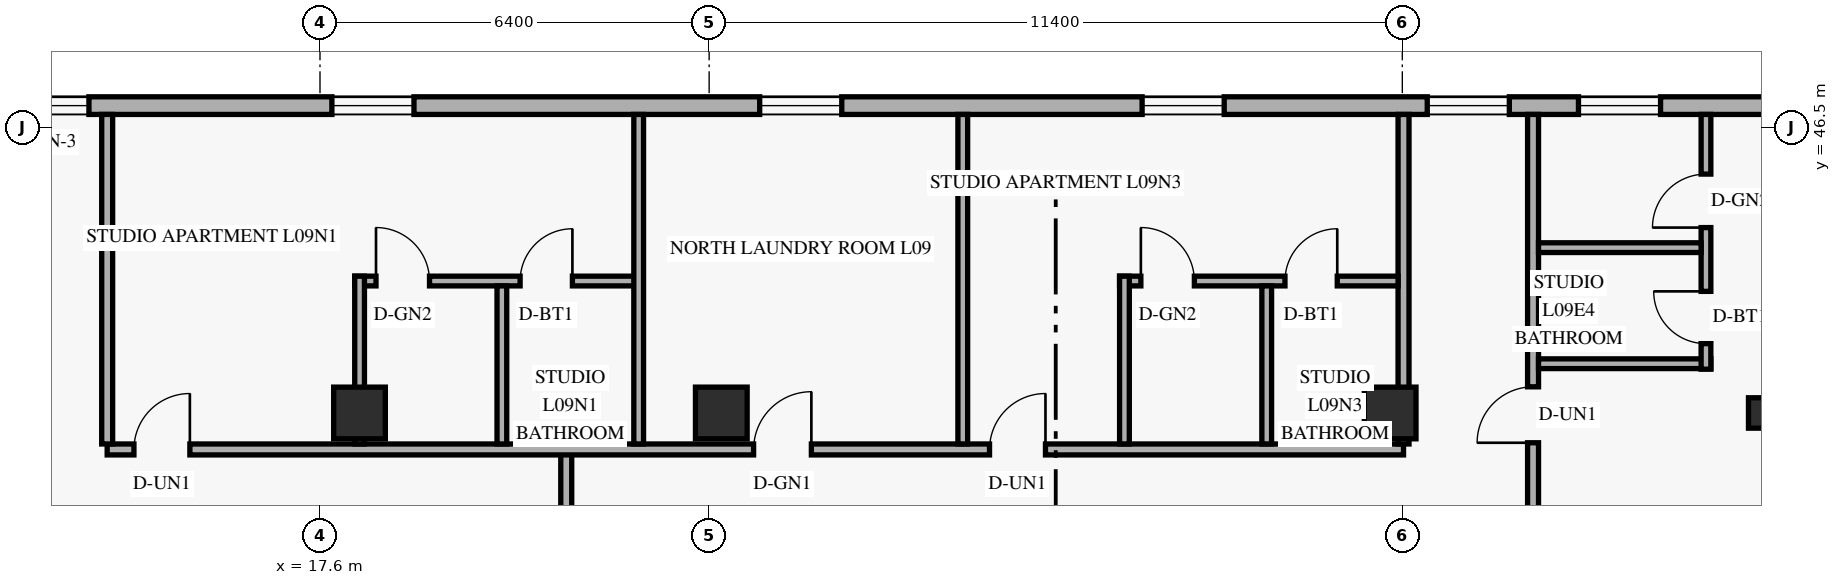
"""IFC4 building model, lengths in metres.
Left out: names, types, materials, properties, quantities, classifications, styles, units other than length and angle.
Written with IfcOpenShell. Run it as: python <this file> out.ifc"""

import sys

from ifc_helpers import new_model, si_unit, direction, frame, frame_2d, origin, origin_2d, place, context, subcontext, project, spatial, rectangle, hollow_rectangle, extrude, element, fill, save


model = new_model("IFC4")
c1 = context("Model", 3, precision=1e-05, world=origin(), true_north=direction((0.0, 1.0)))
c2 = subcontext(c1, "Body", "Model", "MODEL_VIEW")
j1 = project(units=[si_unit("LENGTHUNIT", "METRE"), si_unit("PLANEANGLEUNIT", "RADIAN")], contexts=[c1])
p1 = place(None, origin())
s1 = spatial("IfcSite", under=j1, at=p1, CompositionType="ELEMENT")
p2 = place(p1, origin())
s2 = spatial("IfcBuilding", under=s1, at=p2, CompositionType="ELEMENT")
p3 = place(p2, frame((0.0, 0.0, 38.4)))
s3 = spatial("IfcBuildingStorey", under=s2, at=p3, CompositionType="ELEMENT", Elevation=38.4)
for number, where, z_axis, x_axis in (
    (1, (18.25, 41.8, 0.0), (0.0, 0.0, 1.0), (1.0, 0.0, 0.0)),
    (2, (24.2, 41.8, 0.0), (0.0, 0.0, 1.0), (1.0, 0.0, 0.0)),
    (3, (35.2, 41.8, 0.0), (0.0, 0.0, 1.0), (1.0, 0.0, 0.0)),
):
    element("IfcColumn", number, at=place(p3, frame(where, z_axis=z_axis, x_axis=x_axis)), inside=s3, PredefinedType="COLUMN", context=c2, shape_type="SweptSolid", body=[
        extrude(rectangle(XDim=0.85, YDim=0.85, at=origin_2d()), origin(), (0.0, 0.0, 1.0), 3.6),
    ])
p4 = place(p3, frame((41.28, 41.8, 0.0), z_axis=(0.034971136209, 0.0, 0.999388322742), x_axis=(0.0, 1.0, 0.0)))
e4 = element("IfcColumn", 4, at=p4, inside=s3, PredefinedType="COLUMN", context=c2, shape_type="SweptSolid", body=[
    extrude(hollow_rectangle(XDim=0.5, YDim=0.5, WallThickness=0.022, at=origin_2d()), origin(), (0.0, 0.0, 1.0), 3.602),
])
p5 = place(p3, frame((44.98, 46.855, 0.0), z_axis=(0.0, 0.0, 1.0), x_axis=(-1.0, 0.0, 0.0)))
e5 = element("IfcWall", 5, at=p5, inside=s3, PredefinedType="SOLIDWALL", context=c2, shape_type="SweptSolid", body=[
    extrude(rectangle(XDim=39.56, YDim=0.29, at=frame_2d((19.78, 0.0))), origin(), (0.0, 0.0, 1.0), 3.36),
])
p6 = place(p5, frame((35.445, 0.0, 0.85)))
e6 = element("IfcOpeningElement", 6, at=p6, cuts=e5, PredefinedType="OPENING", context=c2, shape_type="SweptSolid", body=[
    extrude(rectangle(XDim=1.35, YDim=1.55, at=frame_2d((0.675, 0.775))), frame((0.0, 0.155, 0.0), z_axis=(0.0, -1.0, 0.0), x_axis=(1.0, 0.0, 0.0)), (0.0, 0.0, 1.0), 0.31),
])
p7 = place(p5, frame((31.18, 0.0, 0.85)))
e7 = element("IfcOpeningElement", 7, at=p7, cuts=e5, PredefinedType="OPENING", context=c2, shape_type="SweptSolid", body=[
    extrude(rectangle(XDim=1.2, YDim=1.5, at=frame_2d((0.6, 0.75))), frame((0.0, 0.155, 0.0), z_axis=(0.0, -1.0, 0.0), x_axis=(1.0, 0.0, 0.0)), (0.0, 0.0, 1.0), 0.31),
])
p8 = place(p5, frame((25.834, 0.0, 0.85)))
e8 = element("IfcOpeningElement", 8, at=p8, cuts=e5, PredefinedType="OPENING", context=c2, shape_type="SweptSolid", body=[
    extrude(rectangle(XDim=1.35, YDim=1.55, at=frame_2d((0.675, 0.775))), frame((0.0, 0.155, 0.0), z_axis=(0.0, -1.0, 0.0), x_axis=(1.0, 0.0, 0.0)), (0.0, 0.0, 1.0), 0.31),
])
p9 = place(p5, frame((18.799, 0.0, 0.85)))
e9 = element("IfcOpeningElement", 9, at=p9, cuts=e5, PredefinedType="OPENING", context=c2, shape_type="SweptSolid", body=[
    extrude(rectangle(XDim=1.35, YDim=1.55, at=frame_2d((0.675, 0.775))), frame((0.0, 0.155, 0.0), z_axis=(0.0, -1.0, 0.0), x_axis=(1.0, 0.0, 0.0)), (0.0, 0.0, 1.0), 0.31),
])
p10 = place(p5, frame((12.51, 0.0, 0.85)))
e10 = element("IfcOpeningElement", 10, at=p10, cuts=e5, PredefinedType="OPENING", context=c2, shape_type="SweptSolid", body=[
    extrude(rectangle(XDim=1.35, YDim=1.55, at=frame_2d((0.675, 0.775))), frame((0.0, 0.155, 0.0), z_axis=(0.0, -1.0, 0.0), x_axis=(1.0, 0.0, 0.0)), (0.0, 0.0, 1.0), 0.31),
])
p11 = place(p5, frame((7.82, 0.0, 0.85)))
e11 = element("IfcOpeningElement", 11, at=p11, cuts=e5, PredefinedType="OPENING", context=c2, shape_type="SweptSolid", body=[
    extrude(rectangle(XDim=1.35, YDim=1.55, at=frame_2d((0.675, 0.775))), frame((0.0, 0.155, 0.0), z_axis=(0.0, -1.0, 0.0), x_axis=(1.0, 0.0, 0.0)), (0.0, 0.0, 1.0), 0.31),
])
p12 = place(p5, frame((5.333, 0.0, 0.85)))
e12 = element("IfcOpeningElement", 12, at=p12, cuts=e5, PredefinedType="OPENING", context=c2, shape_type="SweptSolid", body=[
    extrude(rectangle(XDim=1.35, YDim=1.55, at=frame_2d((0.675, 0.775))), frame((0.0, 0.155, 0.0), z_axis=(0.0, -1.0, 0.0), x_axis=(1.0, 0.0, 0.0)), (0.0, 0.0, 1.0), 0.31),
])
p13 = place(p5, frame((1.618, 0.0, 0.85)))
e13 = element("IfcOpeningElement", 13, at=p13, cuts=e5, PredefinedType="OPENING", context=c2, shape_type="SweptSolid", body=[
    extrude(rectangle(XDim=1.35, YDim=1.55, at=frame_2d((0.675, 0.775))), frame((0.0, 0.155, 0.0), z_axis=(0.0, -1.0, 0.0), x_axis=(1.0, 0.0, 0.0)), (0.0, 0.0, 1.0), 0.31),
])
p14 = place(p3, frame((37.55, 1.29, 0.0), z_axis=(0.0, 0.0, 1.0), x_axis=(0.0, 1.0, 0.0)))
e14 = element("IfcWall", 14, at=p14, inside=s3, PredefinedType="STANDARD", context=c2, shape_type="SweptSolid", body=[
    extrude(rectangle(XDim=45.42, YDim=0.18, at=frame_2d((22.71, 0.0))), origin(), (0.0, 0.0, 1.0), 2.649),
])
p15 = place(p14, frame((4.46, 0.0, 0.0)))
e15 = element("IfcOpeningElement", 15, at=p15, cuts=e14, PredefinedType="OPENING", context=c2, shape_type="SweptSolid", body=[
    extrude(rectangle(XDim=0.92, YDim=2.15, at=frame_2d((0.46, 1.075))), frame((0.0, 0.1, 0.0), z_axis=(0.0, -1.0, 0.0), x_axis=(1.0, 0.0, 0.0)), (0.0, 0.0, 1.0), 0.2),
])
p16 = place(p14, frame((15.907, 0.0, 0.0)))
e16 = element("IfcOpeningElement", 16, at=p16, cuts=e14, PredefinedType="OPENING", context=c2, shape_type="SweptSolid", body=[
    extrude(rectangle(XDim=0.92, YDim=2.15, at=frame_2d((0.46, 1.075))), frame((0.0, 0.1, 0.0), z_axis=(0.0, -1.0, 0.0), x_axis=(1.0, 0.0, 0.0)), (0.0, 0.0, 1.0), 0.2),
])
p17 = place(p14, frame((28.23, 0.0, 0.0)))
e17 = element("IfcOpeningElement", 17, at=p17, cuts=e14, PredefinedType="OPENING", context=c2, shape_type="SweptSolid", body=[
    extrude(rectangle(XDim=0.92, YDim=2.15, at=frame_2d((0.46, 1.075))), frame((0.0, 0.1, 0.0), z_axis=(0.0, -1.0, 0.0), x_axis=(1.0, 0.0, 0.0)), (0.0, 0.0, 1.0), 0.2),
])
p18 = place(p14, frame((40.02, 0.0, 0.0)))
e18 = element("IfcOpeningElement", 18, at=p18, cuts=e14, PredefinedType="OPENING", context=c2, shape_type="SweptSolid", body=[
    extrude(rectangle(XDim=0.92, YDim=2.15, at=frame_2d((0.46, 1.075))), frame((0.0, 0.1, 0.0), z_axis=(0.0, -1.0, 0.0), x_axis=(1.0, 0.0, 0.0)), (0.0, 0.0, 1.0), 0.2),
])
p19 = place(p3, frame((21.65, 6.8, 0.0), z_axis=(0.0, 0.0, 1.0), x_axis=(0.0, 1.0, 0.0)))
e19 = element("IfcWall", 19, at=p19, inside=s3, PredefinedType="STANDARD", context=c2, shape_type="SweptSolid", body=[
    extrude(rectangle(XDim=34.4, YDim=0.18, at=frame_2d((17.2, 0.0))), origin(), (0.0, 0.0, 1.0), 2.649),
])
p20 = place(p3, frame((14.1, 41.2, 0.0), z_axis=(0.0, 0.0, 1.0), x_axis=(1.0, 0.0, 0.0)))
e20 = element("IfcWall", 20, at=p20, inside=s3, PredefinedType="STANDARD", context=c2, shape_type="SweptSolid", body=[
    extrude(rectangle(XDim=21.32, YDim=0.18, at=frame_2d((10.66, 0.0))), origin(), (0.0, 0.0, 1.0), 2.649),
])
p21 = place(p20, frame((0.44, 0.0, 0.0)))
e21 = element("IfcOpeningElement", 21, at=p21, cuts=e20, PredefinedType="OPENING", context=c2, shape_type="SweptSolid", body=[
    extrude(rectangle(XDim=0.92, YDim=2.15, at=frame_2d((0.46, 1.075))), frame((0.0, 0.1, 0.0), z_axis=(0.0, -1.0, 0.0), x_axis=(1.0, 0.0, 0.0)), (0.0, 0.0, 1.0), 0.2),
])
p22 = place(p20, frame((10.631, 0.0, 0.0)))
e22 = element("IfcOpeningElement", 22, at=p22, cuts=e20, PredefinedType="OPENING", context=c2, shape_type="SweptSolid", body=[
    extrude(rectangle(XDim=0.95, YDim=2.15, at=frame_2d((0.475, 1.075))), frame((0.0, 0.1, 0.0), z_axis=(0.0, -1.0, 0.0), x_axis=(1.0, 0.0, 0.0)), (0.0, 0.0, 1.0), 0.2),
])
p23 = place(p20, frame((14.511, 0.0, 0.0)))
e23 = element("IfcOpeningElement", 23, at=p23, cuts=e20, PredefinedType="OPENING", context=c2, shape_type="SweptSolid", body=[
    extrude(rectangle(XDim=0.92, YDim=2.15, at=frame_2d((0.46, 1.075))), frame((0.0, 0.1, 0.0), z_axis=(0.0, -1.0, 0.0), x_axis=(1.0, 0.0, 0.0)), (0.0, 0.0, 1.0), 0.2),
])
p24 = place(p3, frame((35.42, 41.29, 0.0), z_axis=(0.0, 0.0, 1.0), x_axis=(0.0, 1.0, 0.0)))
e24 = element("IfcWall", 24, at=p24, inside=s3, PredefinedType="PARTITIONING", context=c2, shape_type="SweptSolid", body=[
    extrude(rectangle(XDim=5.42, YDim=0.18, at=frame_2d((2.71, 0.0))), origin(), (0.0, 0.0, 1.0), 3.36),
])
p25 = place(p3, frame((14.1, 41.29, 0.0), z_axis=(0.0, 0.0, 1.0), x_axis=(0.0, 1.0, 0.0)))
e25 = element("IfcWall", 25, at=p25, inside=s3, PredefinedType="PARTITIONING", context=c2, shape_type="SweptSolid", body=[
    extrude(rectangle(XDim=5.42, YDim=0.18, at=frame_2d((2.71, 0.0))), origin(), (0.0, 0.0, 1.0), 2.809),
])
p26 = place(p3, frame((37.64, 42.61, 0.0), z_axis=(0.0, 0.0, 1.0), x_axis=(1.0, 0.0, 0.0)))
e26 = element("IfcWall", 26, at=p26, inside=s3, PredefinedType="PLUMBINGWALL", context=c2, shape_type="SweptSolid", body=[
    extrude(rectangle(XDim=2.834, YDim=0.16, at=frame_2d((1.417, 0.0))), origin(), (0.0, 0.0, 1.0), 3.36),
])
p27 = place(p3, frame((40.394, 42.52, 0.0), z_axis=(0.0, 0.0, 1.0), x_axis=(0.0, 1.0, 0.0)))
e27 = element("IfcWall", 27, at=p27, inside=s3, PredefinedType="PLUMBINGWALL", context=c2, shape_type="SweptSolid", body=[
    extrude(rectangle(XDim=4.19, YDim=0.16, at=frame_2d((2.095, 0.0))), origin(), (0.0, 0.0, 1.0), 3.36),
])
p28 = place(p27, frame((0.42, 0.0, 0.0)))
e28 = element("IfcOpeningElement", 28, at=p28, cuts=e27, PredefinedType="OPENING", context=c2, shape_type="SweptSolid", body=[
    extrude(rectangle(XDim=0.86, YDim=2.12, at=frame_2d((0.43, 1.06))), frame((0.0, 0.09, 0.0), z_axis=(0.0, -1.0, 0.0), x_axis=(1.0, 0.0, 0.0)), (0.0, 0.0, 1.0), 0.18),
])
p29 = place(p27, frame((2.329, 0.0, 0.0)))
e29 = element("IfcOpeningElement", 29, at=p29, cuts=e27, PredefinedType="OPENING", context=c2, shape_type="SweptSolid", body=[
    extrude(rectangle(XDim=0.88, YDim=2.12, at=frame_2d((0.44, 1.06))), frame((0.0, 0.09, 0.0), z_axis=(0.0, -1.0, 0.0), x_axis=(1.0, 0.0, 0.0)), (0.0, 0.0, 1.0), 0.18),
])
p30 = place(p3, frame((37.64, 44.519, 0.0), z_axis=(0.0, 0.0, 1.0), x_axis=(1.0, 0.0, 0.0)))
e30 = element("IfcWall", 30, at=p30, inside=s3, PredefinedType="PLUMBINGWALL", context=c2, shape_type="SweptSolid", body=[
    extrude(rectangle(XDim=2.674, YDim=0.16, at=frame_2d((1.337, 0.0))), origin(), (0.0, 0.0, 1.0), 3.36),
])
p31 = place(p3, frame((18.171, 43.97, 0.0), z_axis=(0.0, 0.0, 1.0), x_axis=(1.0, 0.0, 0.0)))
e31 = element("IfcWall", 31, at=p31, inside=s3, PredefinedType="PLUMBINGWALL", context=c2, shape_type="SweptSolid", body=[
    extrude(rectangle(XDim=4.67, YDim=0.16, at=frame_2d((2.335, 0.0))), origin(), (0.0, 0.0, 1.0), 3.36),
])
p32 = place(p31, frame((0.35, 0.0, 0.0)))
e32 = element("IfcOpeningElement", 32, at=p32, cuts=e31, PredefinedType="OPENING", context=c2, shape_type="SweptSolid", body=[
    extrude(rectangle(XDim=0.88, YDim=2.12, at=frame_2d((0.44, 1.06))), frame((0.0, 0.09, 0.0), z_axis=(0.0, -1.0, 0.0), x_axis=(1.0, 0.0, 0.0)), (0.0, 0.0, 1.0), 0.18),
])
p33 = place(p31, frame((2.72, 0.0, 0.0)))
e33 = element("IfcOpeningElement", 33, at=p33, cuts=e31, PredefinedType="OPENING", context=c2, shape_type="SweptSolid", body=[
    extrude(rectangle(XDim=0.86, YDim=2.12, at=frame_2d((0.43, 1.06))), frame((0.0, 0.09, 0.0), z_axis=(0.0, -1.0, 0.0), x_axis=(1.0, 0.0, 0.0)), (0.0, 0.0, 1.0), 0.18),
])
p34 = place(p3, frame((18.251, 41.29, 0.0), z_axis=(0.0, 0.0, 1.0), x_axis=(0.0, 1.0, 0.0)))
e34 = element("IfcWall", 34, at=p34, inside=s3, PredefinedType="PLUMBINGWALL", context=c2, shape_type="SweptSolid", body=[
    extrude(rectangle(XDim=2.76, YDim=0.16, at=frame_2d((1.38, 0.0))), origin(), (0.0, 0.0, 1.0), 2.649),
])
p35 = place(p3, frame((20.591, 41.29, 0.0), z_axis=(0.0, 0.0, 1.0), x_axis=(0.0, 1.0, 0.0)))
e35 = element("IfcWall", 35, at=p35, inside=s3, PredefinedType="PLUMBINGWALL", context=c2, shape_type="SweptSolid", body=[
    extrude(rectangle(XDim=2.6, YDim=0.16, at=frame_2d((1.3, 0.0))), origin(), (0.0, 0.0, 1.0), 2.809),
])
for number, where, z_axis, x_axis in (
    (36, (22.841, 41.29, 0.0), (0.0, 0.0, 1.0), (0.0, 1.0, 0.0)),
    (37, (28.171, 41.29, 0.0), (0.0, 0.0, 1.0), (0.0, 1.0, 0.0)),
):
    element("IfcWall", number, at=place(p3, frame(where, z_axis=z_axis, x_axis=x_axis)), inside=s3, PredefinedType="PARTITIONING", context=c2, shape_type="SweptSolid", body=[
        extrude(rectangle(XDim=5.42, YDim=0.16, at=frame_2d((2.71, 0.0))), origin(), (0.0, 0.0, 1.0), 2.809),
    ])
p36 = place(p3, frame((30.75, 43.97, 0.0), z_axis=(0.0, 0.0, 1.0), x_axis=(1.0, 0.0, 0.0)))
e38 = element("IfcWall", 38, at=p36, inside=s3, PredefinedType="PLUMBINGWALL", context=c2, shape_type="SweptSolid", body=[
    extrude(rectangle(XDim=4.58, YDim=0.16, at=frame_2d((2.29, 0.0))), origin(), (0.0, 0.0, 1.0), 3.36),
])
p37 = place(p36, frame((0.35, 0.0, 0.0)))
e39 = element("IfcOpeningElement", 39, at=p37, cuts=e38, PredefinedType="OPENING", context=c2, shape_type="SweptSolid", body=[
    extrude(rectangle(XDim=0.88, YDim=2.12, at=frame_2d((0.44, 1.06))), frame((0.0, 0.09, 0.0), z_axis=(0.0, -1.0, 0.0), x_axis=(1.0, 0.0, 0.0)), (0.0, 0.0, 1.0), 0.18),
])
p38 = place(p36, frame((2.72, 0.0, 0.0)))
e40 = element("IfcOpeningElement", 40, at=p38, cuts=e38, PredefinedType="OPENING", context=c2, shape_type="SweptSolid", body=[
    extrude(rectangle(XDim=0.86, YDim=2.12, at=frame_2d((0.43, 1.06))), frame((0.0, 0.09, 0.0), z_axis=(0.0, -1.0, 0.0), x_axis=(1.0, 0.0, 0.0)), (0.0, 0.0, 1.0), 0.18),
])
p39 = place(p3, frame((30.83, 41.29, 0.0), z_axis=(0.0, 0.0, 1.0), x_axis=(0.0, 1.0, 0.0)))
e41 = element("IfcWall", 41, at=p39, inside=s3, PredefinedType="PLUMBINGWALL", context=c2, shape_type="SweptSolid", body=[
    extrude(rectangle(XDim=2.76, YDim=0.16, at=frame_2d((1.38, 0.0))), origin(), (0.0, 0.0, 1.0), 2.809),
])
p40 = place(p3, frame((33.17, 41.29, 0.0), z_axis=(0.0, 0.0, 1.0), x_axis=(0.0, 1.0, 0.0)))
e42 = element("IfcWall", 42, at=p40, inside=s3, PredefinedType="PLUMBINGWALL", context=c2, shape_type="SweptSolid", body=[
    extrude(rectangle(XDim=2.6, YDim=0.16, at=frame_2d((1.3, 0.0))), origin(), (0.0, 0.0, 1.0), 2.809),
])
p41 = place(p7, origin())
e43 = element("IfcWindow", 43, at=p41, inside=s3, PartitioningType="SINGLE_PANEL", PredefinedType="WINDOW", context=c2, shape_type="SweptSolid", body=[
    extrude(rectangle(XDim=1.2, YDim=1.5, at=frame_2d((0.6, 0.75))), frame((0.0, 0.03, 0.0), z_axis=(0.0, -1.0, 0.0), x_axis=(1.0, 0.0, 0.0)), (0.0, 0.0, 1.0), 0.06),
])
fill(e7, e43)
p42 = place(p8, origin())
e44 = element("IfcWindow", 44, at=p42, inside=s3, PartitioningType="SINGLE_PANEL", PredefinedType="WINDOW", context=c2, shape_type="SweptSolid", body=[
    extrude(rectangle(XDim=1.35, YDim=1.55, at=frame_2d((0.675, 0.775))), frame((0.0, 0.03, 0.0), z_axis=(0.0, -1.0, 0.0), x_axis=(1.0, 0.0, 0.0)), (0.0, 0.0, 1.0), 0.06),
])
fill(e8, e44)
p43 = place(p9, origin())
e45 = element("IfcWindow", 45, at=p43, inside=s3, PartitioningType="SINGLE_PANEL", PredefinedType="WINDOW", context=c2, shape_type="SweptSolid", body=[
    extrude(rectangle(XDim=1.35, YDim=1.55, at=frame_2d((0.675, 0.775))), frame((0.0, 0.03, 0.0), z_axis=(0.0, -1.0, 0.0), x_axis=(1.0, 0.0, 0.0)), (0.0, 0.0, 1.0), 0.06),
])
fill(e9, e45)
p44 = place(p10, origin())
e46 = element("IfcWindow", 46, at=p44, inside=s3, PartitioningType="SINGLE_PANEL", PredefinedType="WINDOW", context=c2, shape_type="SweptSolid", body=[
    extrude(rectangle(XDim=1.35, YDim=1.55, at=frame_2d((0.675, 0.775))), frame((0.0, 0.03, 0.0), z_axis=(0.0, -1.0, 0.0), x_axis=(1.0, 0.0, 0.0)), (0.0, 0.0, 1.0), 0.06),
])
fill(e10, e46)
p45 = place(p11, origin())
e47 = element("IfcWindow", 47, at=p45, inside=s3, PartitioningType="SINGLE_PANEL", PredefinedType="WINDOW", context=c2, shape_type="SweptSolid", body=[
    extrude(rectangle(XDim=1.35, YDim=1.55, at=frame_2d((0.675, 0.775))), frame((0.0, 0.03, 0.0), z_axis=(0.0, -1.0, 0.0), x_axis=(1.0, 0.0, 0.0)), (0.0, 0.0, 1.0), 0.06),
])
fill(e11, e47)
p46 = place(p12, origin())
e48 = element("IfcWindow", 48, at=p46, inside=s3, PartitioningType="SINGLE_PANEL", PredefinedType="WINDOW", context=c2, shape_type="SweptSolid", body=[
    extrude(rectangle(XDim=1.35, YDim=1.55, at=frame_2d((0.675, 0.775))), frame((0.0, 0.03, 0.0), z_axis=(0.0, -1.0, 0.0), x_axis=(1.0, 0.0, 0.0)), (0.0, 0.0, 1.0), 0.06),
])
fill(e12, e48)
p47 = place(p18, origin())
e49 = element("IfcDoor", 49, at=p47, inside=s3, OperationType="SINGLE_SWING_LEFT", PredefinedType="DOOR", context=c2, shape_type="SweptSolid", body=[
    extrude(rectangle(XDim=0.92, YDim=2.15, at=frame_2d((0.46, 1.075))), frame((0.0, 0.025, 0.0), z_axis=(0.0, -1.0, 0.0), x_axis=(1.0, 0.0, 0.0)), (0.0, 0.0, 1.0), 0.05),
])
fill(e18, e49)
p48 = place(p28, origin())
e50 = element("IfcDoor", 50, at=p48, inside=s3, OperationType="SINGLE_SWING_RIGHT", PredefinedType="DOOR", context=c2, shape_type="SweptSolid", body=[
    extrude(rectangle(XDim=0.86, YDim=2.12, at=frame_2d((0.43, 1.06))), frame((0.0, 0.025, 0.0), z_axis=(0.0, -1.0, 0.0), x_axis=(1.0, 0.0, 0.0)), (0.0, 0.0, 1.0), 0.05),
])
fill(e28, e50)
p49 = place(p29, origin())
e51 = element("IfcDoor", 51, at=p49, inside=s3, OperationType="SINGLE_SWING_LEFT", PredefinedType="DOOR", context=c2, shape_type="SweptSolid", body=[
    extrude(rectangle(XDim=0.88, YDim=2.12, at=frame_2d((0.44, 1.06))), frame((0.0, 0.025, 0.0), z_axis=(0.0, -1.0, 0.0), x_axis=(1.0, 0.0, 0.0)), (0.0, 0.0, 1.0), 0.05),
])
fill(e29, e51)
p50 = place(p21, origin())
e52 = element("IfcDoor", 52, at=p50, inside=s3, OperationType="SINGLE_SWING_RIGHT", PredefinedType="DOOR", context=c2, shape_type="SweptSolid", body=[
    extrude(rectangle(XDim=0.92, YDim=2.15, at=frame_2d((0.46, 1.075))), frame((0.0, 0.025, 0.0), z_axis=(0.0, -1.0, 0.0), x_axis=(1.0, 0.0, 0.0)), (0.0, 0.0, 1.0), 0.05),
])
fill(e21, e52)
p51 = place(p32, origin())
e53 = element("IfcDoor", 53, at=p51, inside=s3, OperationType="SINGLE_SWING_LEFT", PredefinedType="DOOR", context=c2, shape_type="SweptSolid", body=[
    extrude(rectangle(XDim=0.88, YDim=2.12, at=frame_2d((0.44, 1.06))), frame((0.0, 0.025, 0.0), z_axis=(0.0, -1.0, 0.0), x_axis=(1.0, 0.0, 0.0)), (0.0, 0.0, 1.0), 0.05),
])
fill(e32, e53)
p52 = place(p33, origin())
e54 = element("IfcDoor", 54, at=p52, inside=s3, OperationType="SINGLE_SWING_RIGHT", PredefinedType="DOOR", context=c2, shape_type="SweptSolid", body=[
    extrude(rectangle(XDim=0.86, YDim=2.12, at=frame_2d((0.43, 1.06))), frame((0.0, 0.025, 0.0), z_axis=(0.0, -1.0, 0.0), x_axis=(1.0, 0.0, 0.0)), (0.0, 0.0, 1.0), 0.05),
])
fill(e33, e54)
p53 = place(p22, origin())
e55 = element("IfcDoor", 55, at=p53, inside=s3, OperationType="SINGLE_SWING_RIGHT", PredefinedType="DOOR", context=c2, shape_type="SweptSolid", body=[
    extrude(rectangle(XDim=0.95, YDim=2.15, at=frame_2d((0.475, 1.075))), frame((0.0, 0.025, 0.0), z_axis=(0.0, -1.0, 0.0), x_axis=(1.0, 0.0, 0.0)), (0.0, 0.0, 1.0), 0.05),
])
fill(e22, e55)
p54 = place(p23, origin())
e56 = element("IfcDoor", 56, at=p54, inside=s3, OperationType="SINGLE_SWING_RIGHT", PredefinedType="DOOR", context=c2, shape_type="SweptSolid", body=[
    extrude(rectangle(XDim=0.92, YDim=2.15, at=frame_2d((0.46, 1.075))), frame((0.0, 0.025, 0.0), z_axis=(0.0, -1.0, 0.0), x_axis=(1.0, 0.0, 0.0)), (0.0, 0.0, 1.0), 0.05),
])
fill(e23, e56)
p55 = place(p37, origin())
e57 = element("IfcDoor", 57, at=p55, inside=s3, OperationType="SINGLE_SWING_LEFT", PredefinedType="DOOR", context=c2, shape_type="SweptSolid", body=[
    extrude(rectangle(XDim=0.88, YDim=2.12, at=frame_2d((0.44, 1.06))), frame((0.0, 0.025, 0.0), z_axis=(0.0, -1.0, 0.0), x_axis=(1.0, 0.0, 0.0)), (0.0, 0.0, 1.0), 0.05),
])
fill(e39, e57)
p56 = place(p38, origin())
e58 = element("IfcDoor", 58, at=p56, inside=s3, OperationType="SINGLE_SWING_RIGHT", PredefinedType="DOOR", context=c2, shape_type="SweptSolid", body=[
    extrude(rectangle(XDim=0.86, YDim=2.12, at=frame_2d((0.43, 1.06))), frame((0.0, 0.025, 0.0), z_axis=(0.0, -1.0, 0.0), x_axis=(1.0, 0.0, 0.0)), (0.0, 0.0, 1.0), 0.05),
])
fill(e40, e58)
save(model, sys.argv[1])
